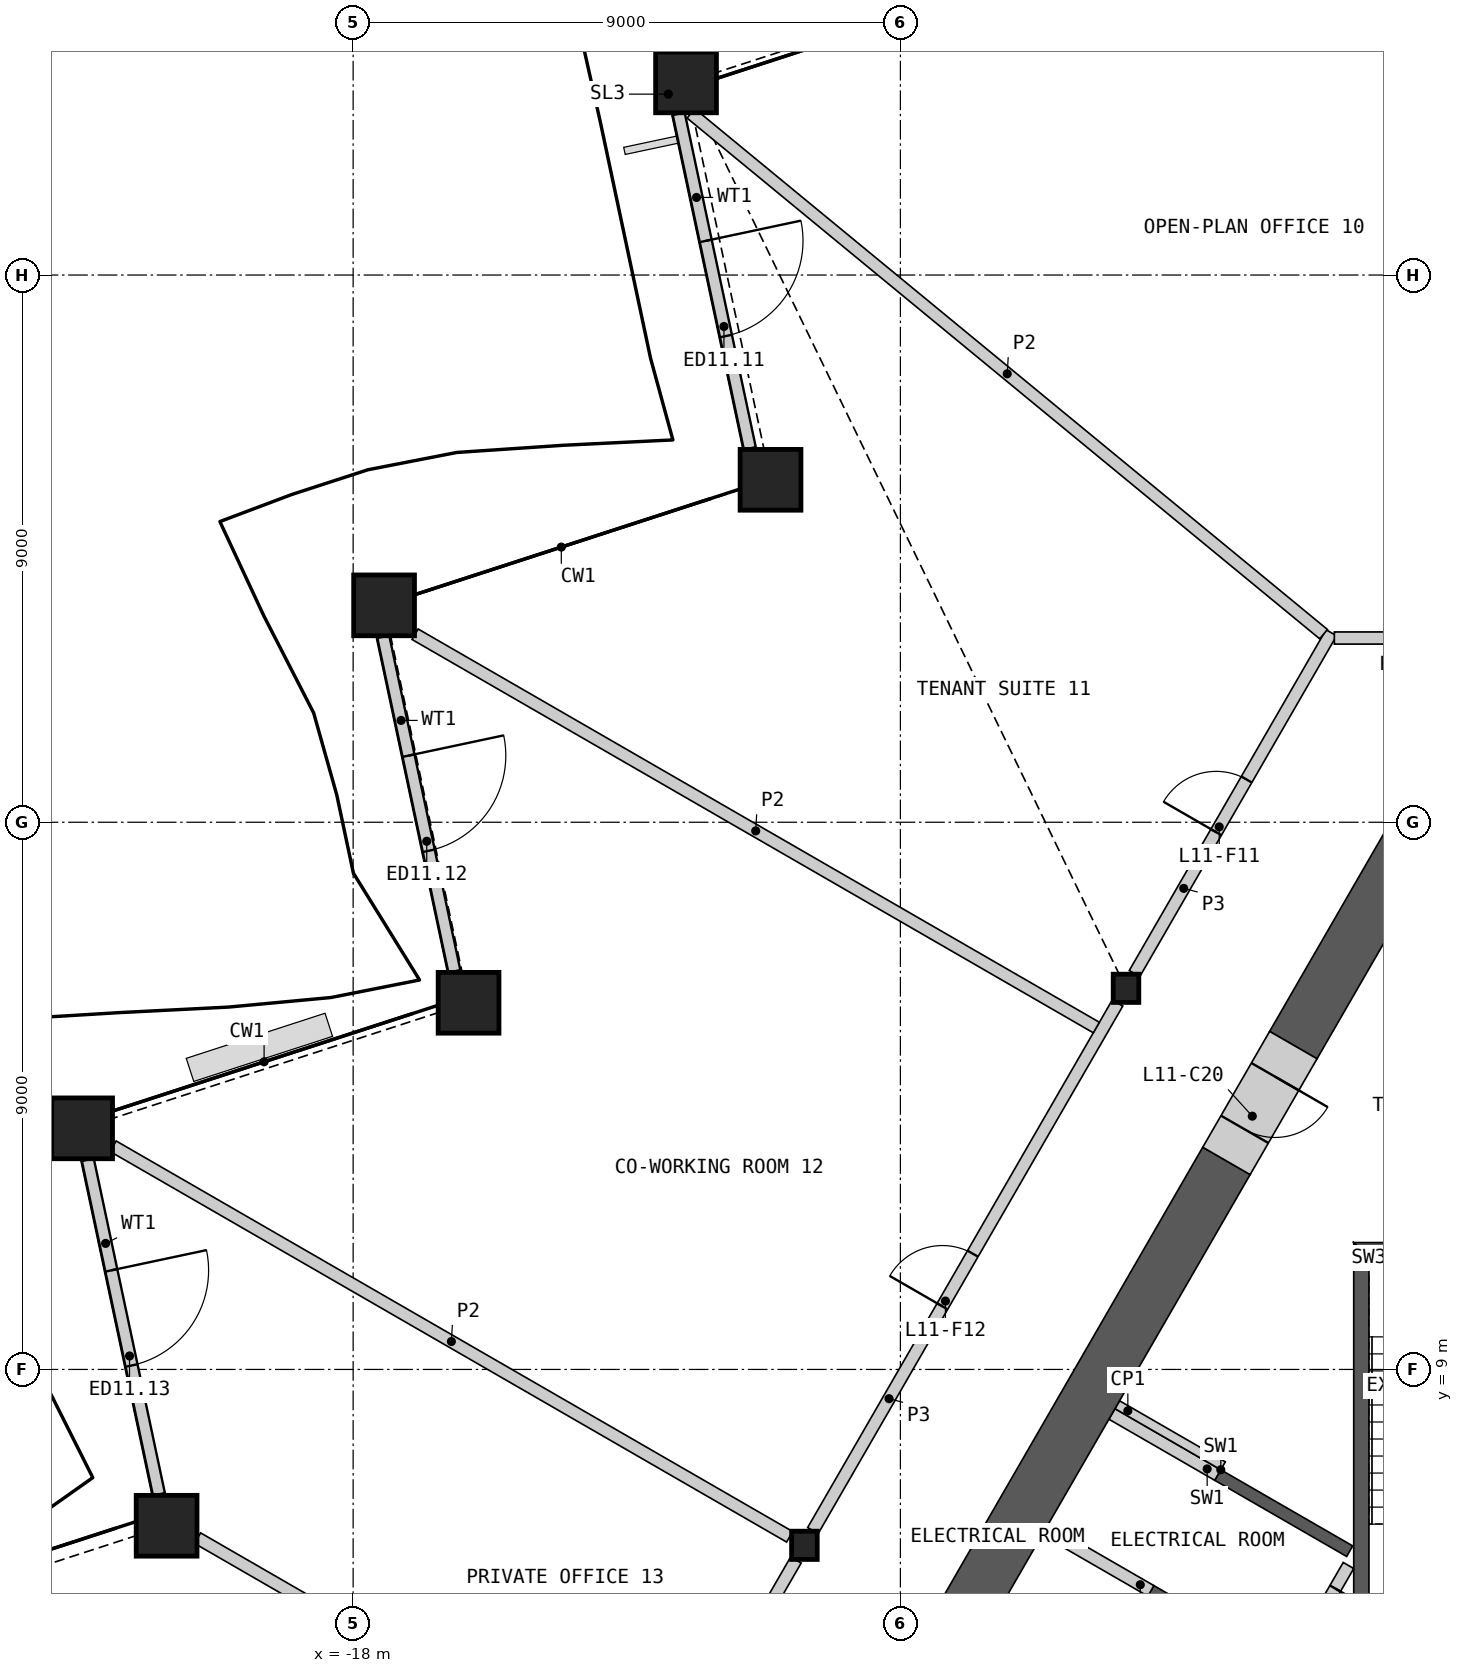
"""IFC4 building model, lengths in metres.
Left out: names, types, materials, properties, quantities, classifications, styles, units other than length and angle.
Written with IfcOpenShell. Run it as: python <this file> out.ifc"""

import sys

from ifc_helpers import new_model, si_unit, direction, frame, frame_2d, origin, origin_2d, place, context, subcontext, project, spatial, polyline, rectangle, hollow_rectangle, i_section, outline, extrude, element, fill, save


model = new_model("IFC4")
c1 = context("Model", 3, precision=1e-05, world=origin(), true_north=direction((0.0, 1.0)))
c2 = subcontext(c1, "Body", "Model", "MODEL_VIEW")
j1 = project(units=[si_unit("LENGTHUNIT", "METRE"), si_unit("PLANEANGLEUNIT", "RADIAN")], contexts=[c1])
p1 = place(None, origin())
s1 = spatial("IfcSite", under=j1, at=p1, CompositionType="ELEMENT")
p2 = place(p1, origin())
s2 = spatial("IfcBuilding", under=s1, at=p2, CompositionType="ELEMENT")
p3 = place(p2, frame((0.0, 0.0, 55.2)))
s3 = spatial("IfcBuildingStorey", under=s2, at=p3, CompositionType="ELEMENT", Elevation=55.2)
for number, where, z_axis, x_axis in (
    (1, (-12.525, 30.169, 0.0), (0.0, 0.0, 1.0), (1.0, 0.0, 0.0)),
    (2, (-11.136, 23.632, 0.0), (0.0, 0.0, 1.0), (1.0, 0.0, 0.0)),
    (3, (-17.491, 21.567, 0.0), (0.0, 0.0, 1.0), (1.0, 0.0, 0.0)),
    (4, (-16.102, 15.031, 0.0), (0.0, 0.0, 1.0), (1.0, 0.0, 0.0)),
    (5, (-22.457, 12.966, 0.0), (0.0, 0.0, 1.0), (1.0, 0.0, 0.0)),
    (6, (-21.068, 6.429, 0.0), (0.0, 0.0, 1.0), (1.0, 0.0, 0.0)),
):
    element("IfcColumn", number, at=place(p3, frame(where, z_axis=z_axis, x_axis=x_axis)), inside=s3, PredefinedType="COLUMN", context=c2, shape_type="SweptSolid", body=[
        extrude(hollow_rectangle(XDim=1.0, YDim=1.0, WallThickness=0.07, at=origin_2d()), origin(), (0.0, 0.0, 1.0), 4.2),
    ])
for number, where, z_axis, x_axis in (
    (7, (-5.289, 15.269, 0.0), (0.0, 0.0, 1.0), (1.0, 0.0, 0.0)),
    (8, (-10.578, 6.107, 0.0), (0.0, 0.0, 1.0), (1.0, 0.0, 0.0)),
):
    element("IfcColumn", number, at=place(p3, frame(where, z_axis=z_axis, x_axis=x_axis)), inside=s3, PredefinedType="COLUMN", context=c2, shape_type="SweptSolid", body=[
        extrude(i_section(OverallWidth=0.421, OverallDepth=0.465, WebThickness=0.045, FlangeThickness=0.072, at=origin_2d()), origin(), (0.0, 0.0, 1.0), 4.2),
    ])
p4 = place(p3, frame((-12.646, 29.652, 0.0), z_axis=(0.0, 0.0, 1.0), x_axis=(0.207901831982, -0.978149696242, 0.0)))
e9 = element("IfcWall", 9, at=p4, inside=s3, PredefinedType="SOLIDWALL", context=c2, shape_type="SweptSolid", body=[
    extrude(rectangle(XDim=5.626, YDim=0.2, at=frame_2d((2.813, 0.0))), origin(), (0.0, 0.0, 1.0), 3.189),
])
p5 = place(p4, frame((2.137, 0.0, 0.0)))
e10 = element("IfcOpeningElement", 10, at=p5, cuts=e9, PredefinedType="OPENING", context=c2, shape_type="SweptSolid", body=[
    extrude(rectangle(XDim=1.6, YDim=2.4, at=frame_2d((0.8, 1.2))), frame((0.0, 0.11, 0.0), z_axis=(0.0, -1.0, 0.0), x_axis=(1.0, 0.0, 0.0)), (0.0, 0.0, 1.0), 0.22),
])
p6 = place(p3, frame((-17.504, 21.051, 0.0), z_axis=(0.0, 0.0, 1.0), x_axis=(0.207901831982, -0.978149696242, 0.0)))
e11 = element("IfcWall", 11, at=p6, inside=s3, PredefinedType="SOLIDWALL", context=c2, shape_type="SweptSolid", body=[
    extrude(rectangle(XDim=5.626, YDim=0.2, at=frame_2d((2.813, 0.0))), origin(), (0.0, 0.0, 1.0), 3.189),
])
p7 = place(p6, frame((1.998, 0.0, 0.0)))
e12 = element("IfcOpeningElement", 12, at=p7, cuts=e11, PredefinedType="OPENING", context=c2, shape_type="SweptSolid", body=[
    extrude(rectangle(XDim=1.6, YDim=2.4, at=frame_2d((0.8, 1.2))), frame((0.0, 0.11, 0.0), z_axis=(0.0, -1.0, 0.0), x_axis=(1.0, 0.0, 0.0)), (0.0, 0.0, 1.0), 0.22),
])
p8 = place(p3, frame((-22.363, 12.449, 0.0), z_axis=(0.0, 0.0, 1.0), x_axis=(0.207901831982, -0.978149696242, 0.0)))
e13 = element("IfcWall", 13, at=p8, inside=s3, PredefinedType="SOLIDWALL", context=c2, shape_type="SweptSolid", body=[
    extrude(rectangle(XDim=5.626, YDim=0.2, at=frame_2d((2.813, 0.0))), origin(), (0.0, 0.0, 1.0), 3.189),
])
p9 = place(p8, frame((1.86, 0.0, 0.0)))
e14 = element("IfcOpeningElement", 14, at=p9, cuts=e13, PredefinedType="OPENING", context=c2, shape_type="SweptSolid", body=[
    extrude(rectangle(XDim=1.6, YDim=2.4, at=frame_2d((0.8, 1.2))), frame((0.0, 0.11, 0.0), z_axis=(0.0, -1.0, 0.0), x_axis=(1.0, 0.0, 0.0)), (0.0, 0.0, 1.0), 0.22),
])
p10 = place(p3, origin())
e15 = element("IfcWall", 15, at=p10, inside=s3, PredefinedType="SHEAR", context=c2, shape_type="SweptSolid", body=[
    extrude(outline(polyline([(-2.76, 4.019), (-4.931, 5.272), (-4.831, 5.445), (-2.66, 4.192), (-2.76, 4.019)])), origin(), (0.0, 0.0, 1.0), 3.8),
])
p11 = place(p3, origin())
e16 = element("IfcWall", 16, at=p11, inside=s3, PredefinedType="SHEAR", context=c2, shape_type="SweptSolid", body=[
    extrude(outline(polyline([(-3.731, 7.35), (-1.561, 6.097), (-1.66, 5.924), (-3.831, 7.177), (-3.731, 7.35)])), origin(), (0.0, 0.0, 1.0), 3.8),
])
p12 = place(p3, frame((-1.631, 5.776, 0.0), z_axis=(0.0, 0.0, 1.0), x_axis=(-0.499992876559, -0.866029516466, 0.0)))
e17 = element("IfcWall", 17, at=p12, inside=s3, PredefinedType="SOLIDWALL", context=c2, shape_type="SweptSolid", body=[
    extrude(rectangle(XDim=6.486, YDim=0.2, at=frame_2d((3.243, 0.0))), origin(), (0.0, 0.0, 1.0), 3.8),
])
p13 = place(p12, frame((0.437, 0.0, 0.0)))
e18 = element("IfcOpeningElement", 18, at=p13, cuts=e17, PredefinedType="OPENING", context=c2, shape_type="SweptSolid", body=[
    extrude(rectangle(XDim=0.9, YDim=2.1, at=frame_2d((0.45, 1.05))), frame((0.0, 0.11, 0.0), z_axis=(0.0, -1.0, 0.0), x_axis=(1.0, 0.0, 0.0)), (0.0, 0.0, 1.0), 0.22),
])
p14 = place(p12, frame((2.637, 0.0, 0.0)))
e19 = element("IfcOpeningElement", 19, at=p14, cuts=e17, PredefinedType="OPENING", context=c2, shape_type="SweptSolid", body=[
    extrude(rectangle(XDim=0.9, YDim=2.1, at=frame_2d((0.45, 1.05))), frame((0.0, 0.11, 0.0), z_axis=(0.0, -1.0, 0.0), x_axis=(1.0, 0.0, 0.0)), (0.0, 0.0, 1.0), 0.22),
])
p15 = place(p3, frame((-3.781, 7.263, 0.0), z_axis=(0.0, 0.0, 1.0), x_axis=(-0.865983199114, 0.50007309351, 0.0)))
e20 = element("IfcWall", 20, at=p15, inside=s3, PredefinedType="SHEAR", context=c2, shape_type="SweptSolid", body=[
    extrude(rectangle(XDim=2.009, YDim=0.2, at=frame_2d((1.004, 0.0))), origin(), (0.0, 0.0, 1.0), 3.8),
])
p16 = place(p3, frame((-4.881, 5.358, 0.0), z_axis=(0.0, 0.0, 1.0), x_axis=(-0.866035824272, 0.499981950752, 0.0)))
e21 = element("IfcWall", 21, at=p16, inside=s3, PredefinedType="SHEAR", context=c2, shape_type="SweptSolid", body=[
    extrude(rectangle(XDim=2.009, YDim=0.2, at=frame_2d((1.004, 0.0))), origin(), (0.0, 0.0, 1.0), 3.8),
])
p17 = place(p3, origin())
e22 = element("IfcWall", 22, at=p17, inside=s3, PredefinedType="SHEAR", context=c2, shape_type="SweptSolid", body=[
    extrude(outline(polyline([(1.544, 11.087), (-1.544, 11.087), (-1.294, 10.837), (1.294, 10.837), (1.544, 11.087)])), origin(), (0.0, 0.0, 1.0), 3.8),
])
p18 = place(p3, origin())
e23 = element("IfcWall", 23, at=p18, inside=s3, PredefinedType="SHEAR", context=c2, shape_type="SweptSolid", body=[
    extrude(outline(polyline([(-1.294, 10.837), (-1.544, 11.087), (-1.544, 5.237), (-1.294, 5.237), (-1.294, 10.837)])), origin(), (0.0, 0.0, 1.0), 3.8),
])
p19 = place(p3, frame((-3.693, 7.415, 0.0), z_axis=(0.0, 0.0, 1.0), x_axis=(-0.866035824272, 0.499981950752, 0.0)))
e24 = element("IfcWall", 24, at=p19, inside=s3, PredefinedType="PARTITIONING", context=c2, shape_type="SweptSolid", body=[
    extrude(rectangle(XDim=2.009, YDim=0.15, at=frame_2d((1.004, 0.0))), origin(), (0.0, 0.0, 1.0), 3.8),
])
p20 = place(p3, frame((-3.637, 12.43, 0.0), z_axis=(0.0, 0.0, 1.0), x_axis=(-0.500011513458, -0.866018756384, 0.0)))
e25 = element("IfcWall", 25, at=p20, inside=s3, PredefinedType="SHEAR", context=c2, shape_type="SweptSolid", body=[
    extrude(rectangle(XDim=9.066, YDim=0.9, at=frame_2d((4.533, 0.0))), origin(), (0.0, 0.0, 1.0), 3.8),
])
p21 = place(p3, frame((-0.39, 18.055, 0.0), z_axis=(0.0, 0.0, 1.0), x_axis=(-0.500014347272, -0.866017120224, 0.0)))
e26 = element("IfcWall", 26, at=p21, inside=s3, PredefinedType="SHEAR", context=c2, shape_type="SweptSolid", body=[
    extrude(rectangle(XDim=4.296, YDim=0.9, at=frame_2d((2.148, 0.0))), origin(), (0.0, 0.0, 1.0), 3.8),
])
p22 = place(p3, frame((-2.538, 14.335, 0.0), z_axis=(0.0, 0.0, 1.0), x_axis=(-0.499994660107, -0.866028486751, 0.0)))
e27 = element("IfcWall", 27, at=p22, inside=s3, PredefinedType="SHEAR", context=c2, shape_type="SweptSolid", body=[
    extrude(rectangle(XDim=2.2, YDim=0.9, at=frame_2d((1.1, 0.0))), origin(), (0.0, 0.0, 1.0), 3.8),
])
p23 = place(p22, frame((0.6, 0.0, 0.0)))
e28 = element("IfcOpeningElement", 28, at=p23, cuts=e27, PredefinedType="OPENING", context=c2, shape_type="SweptSolid", body=[
    extrude(rectangle(XDim=1.0, YDim=2.1, at=frame_2d((0.5, 1.05))), frame((0.0, 0.46, 0.0), z_axis=(0.0, -1.0, 0.0), x_axis=(1.0, 0.0, 0.0)), (0.0, 0.0, 1.0), 0.92),
])
p24 = place(p3, frame((-10.439, 6.35, 0.0), z_axis=(0.0, 0.0, 1.0), x_axis=(0.50001002959, 0.86601961312, 0.0)))
e29 = element("IfcWall", 29, at=p24, inside=s3, PredefinedType="PARTITIONING", context=c2, shape_type="SweptSolid", body=[
    extrude(rectangle(XDim=10.019, YDim=0.2, at=frame_2d((5.009, 0.0))), origin(), (0.0, 0.0, 1.0), 3.8),
])
p25 = place(p24, frame((4.259, 0.0, 0.0)))
e30 = element("IfcOpeningElement", 30, at=p25, cuts=e29, PredefinedType="OPENING", context=c2, shape_type="SweptSolid", body=[
    extrude(rectangle(XDim=1.0, YDim=2.1, at=frame_2d((0.5, 1.05))), frame((0.0, 0.11, 0.0), z_axis=(0.0, -1.0, 0.0), x_axis=(1.0, 0.0, 0.0)), (0.0, 0.0, 1.0), 0.22),
])
p26 = place(p3, frame((-15.728, -2.811, 0.0), z_axis=(0.0, 0.0, 1.0), x_axis=(0.49999175339, 0.866030164915, 0.0)))
e31 = element("IfcWall", 31, at=p26, inside=s3, PredefinedType="PARTITIONING", context=c2, shape_type="SweptSolid", body=[
    extrude(rectangle(XDim=10.019, YDim=0.2, at=frame_2d((5.009, 0.0))), origin(), (0.0, 0.0, 1.0), 3.8),
])
p27 = place(p26, frame((7.266, 0.0, 0.0)))
e32 = element("IfcOpeningElement", 32, at=p27, cuts=e31, PredefinedType="OPENING", context=c2, shape_type="SweptSolid", body=[
    extrude(rectangle(XDim=1.0, YDim=2.1, at=frame_2d((0.5, 1.05))), frame((0.0, 0.11, 0.0), z_axis=(0.0, -1.0, 0.0), x_axis=(1.0, 0.0, 0.0)), (0.0, 0.0, 1.0), 0.22),
])
p28 = place(p3, frame((-5.149, 15.511, 0.0), z_axis=(0.0, 0.0, 1.0), x_axis=(0.500001069878, 0.866024786089, 0.0)))
e33 = element("IfcWall", 33, at=p28, inside=s3, PredefinedType="PARTITIONING", context=c2, shape_type="SweptSolid", body=[
    extrude(rectangle(XDim=6.473, YDim=0.2, at=frame_2d((3.236, 0.0))), origin(), (0.0, 0.0, 1.0), 3.8),
])
p29 = place(p28, frame((2.686, 0.0, 0.0)))
e34 = element("IfcOpeningElement", 34, at=p29, cuts=e33, PredefinedType="OPENING", context=c2, shape_type="SweptSolid", body=[
    extrude(rectangle(XDim=1.0, YDim=2.1, at=frame_2d((0.5, 1.05))), frame((0.0, 0.11, 0.0), z_axis=(0.0, -1.0, 0.0), x_axis=(1.0, 0.0, 0.0)), (0.0, 0.0, 1.0), 0.22),
])
p30 = place(p3, frame((-1.863, 21.03, 0.0), z_axis=(0.0, 0.0, 1.0), x_axis=(1.0, 0.0, 0.0)))
e35 = element("IfcWall", 35, at=p30, inside=s3, PredefinedType="PARTITIONING", context=c2, shape_type="SweptSolid", body=[
    extrude(rectangle(XDim=3.726, YDim=0.2, at=frame_2d((1.863, 0.0))), origin(), (0.0, 0.0, 1.0), 3.8),
])
p31 = place(p30, frame((0.963, 0.0, 0.0)))
e36 = element("IfcOpeningElement", 36, at=p31, cuts=e35, PredefinedType="OPENING", context=c2, shape_type="SweptSolid", body=[
    extrude(rectangle(XDim=1.8, YDim=2.1, at=frame_2d((0.9, 1.05))), frame((0.0, 0.11, 0.0), z_axis=(0.0, -1.0, 0.0), x_axis=(1.0, 0.0, 0.0)), (0.0, 0.0, 1.0), 0.22),
])
p32 = place(p3, frame((-12.445, 29.659, 0.0), z_axis=(0.0, 0.0, 1.0), x_axis=(0.772048928551, -0.635563098302, 0.0)))
e37 = element("IfcWall", 37, at=p32, inside=s3, PredefinedType="PARTITIONING", context=c2, shape_type="SweptSolid", body=[
    extrude(rectangle(XDim=13.477, YDim=0.2, at=frame_2d((6.738, 0.0))), origin(), (0.0, 0.0, 1.0), 2.885),
])
p33 = place(p3, frame((-16.981, 21.092, 0.0), z_axis=(0.0, 0.0, 1.0), x_axis=(0.866026884493, -0.499997435328, 0.0)))
e38 = element("IfcWall", 38, at=p33, inside=s3, PredefinedType="PARTITIONING", context=c2, shape_type="SweptSolid", body=[
    extrude(rectangle(XDim=12.937, YDim=0.2, at=frame_2d((6.469, 0.0))), origin(), (0.0, 0.0, 1.0), 2.885),
])
p34 = place(p3, frame((-21.947, 12.671, 0.0), z_axis=(0.0, 0.0, 1.0), x_axis=(0.866026729935, -0.499997703033, 0.0)))
e39 = element("IfcWall", 39, at=p34, inside=s3, PredefinedType="PARTITIONING", context=c2, shape_type="SweptSolid", body=[
    extrude(rectangle(XDim=12.848, YDim=0.2, at=frame_2d((6.424, 0.0))), origin(), (0.0, 0.0, 1.0), 2.885),
])
p35 = place(p3, frame((-20.558, 6.225, 0.0), z_axis=(0.0, 0.0, 1.0), x_axis=(0.866031967744, -0.499988630717, 0.0)))
e40 = element("IfcWall", 40, at=p35, inside=s3, PredefinedType="PARTITIONING", context=c2, shape_type="SweptSolid", body=[
    extrude(rectangle(XDim=8.601, YDim=0.2, at=frame_2d((4.301, 0.0))), origin(), (0.0, 0.0, 1.0), 2.885),
])
p36 = place(p5, origin())
e41 = element("IfcDoor", 41, at=p36, inside=s3, OperationType="DOUBLE_DOOR_SINGLE_SWING", PredefinedType="DOOR", context=c2, shape_type="SweptSolid", body=[
    extrude(rectangle(XDim=1.6, YDim=2.4, at=frame_2d((0.8, 1.2))), frame((0.0, 0.025, 0.0), z_axis=(0.0, -1.0, 0.0), x_axis=(1.0, 0.0, 0.0)), (0.0, 0.0, 1.0), 0.05),
])
fill(e10, e41)
p37 = place(p7, origin())
e42 = element("IfcDoor", 42, at=p37, inside=s3, OperationType="DOUBLE_DOOR_SINGLE_SWING", PredefinedType="DOOR", context=c2, shape_type="SweptSolid", body=[
    extrude(rectangle(XDim=1.6, YDim=2.4, at=frame_2d((0.8, 1.2))), frame((0.0, 0.025, 0.0), z_axis=(0.0, -1.0, 0.0), x_axis=(1.0, 0.0, 0.0)), (0.0, 0.0, 1.0), 0.05),
])
fill(e12, e42)
p38 = place(p9, origin())
e43 = element("IfcDoor", 43, at=p38, inside=s3, OperationType="DOUBLE_DOOR_SINGLE_SWING", PredefinedType="DOOR", context=c2, shape_type="SweptSolid", body=[
    extrude(rectangle(XDim=1.6, YDim=2.4, at=frame_2d((0.8, 1.2))), frame((0.0, 0.025, 0.0), z_axis=(0.0, -1.0, 0.0), x_axis=(1.0, 0.0, 0.0)), (0.0, 0.0, 1.0), 0.05),
])
fill(e14, e43)
p39 = place(p13, origin())
e44 = element("IfcDoor", 44, at=p39, inside=s3, OperationType="SINGLE_SWING_LEFT", PredefinedType="DOOR", context=c2, shape_type="SweptSolid", body=[
    extrude(rectangle(XDim=0.9, YDim=2.1, at=frame_2d((0.45, 1.05))), frame((0.0, 0.025, 0.0), z_axis=(0.0, -1.0, 0.0), x_axis=(1.0, 0.0, 0.0)), (0.0, 0.0, 1.0), 0.05),
])
fill(e18, e44)
p40 = place(p23, origin())
e45 = element("IfcDoor", 45, at=p40, inside=s3, OperationType="SINGLE_SWING_LEFT", PredefinedType="DOOR", context=c2, shape_type="SweptSolid", body=[
    extrude(rectangle(XDim=1.0, YDim=2.1, at=frame_2d((0.5, 1.05))), frame((0.0, 0.205, 0.0), z_axis=(0.0, -1.0, 0.0), x_axis=(1.0, 0.0, 0.0)), (0.0, 0.0, 1.0), 0.05),
])
fill(e28, e45)
p41 = place(p29, origin())
e46 = element("IfcDoor", 46, at=p41, inside=s3, OperationType="SINGLE_SWING_LEFT", PredefinedType="DOOR", context=c2, shape_type="SweptSolid", body=[
    extrude(rectangle(XDim=1.0, YDim=2.1, at=frame_2d((0.5, 1.05))), frame((0.0, 0.025, 0.0), z_axis=(0.0, -1.0, 0.0), x_axis=(1.0, 0.0, 0.0)), (0.0, 0.0, 1.0), 0.05),
])
fill(e34, e46)
p42 = place(p25, origin())
e47 = element("IfcDoor", 47, at=p42, inside=s3, OperationType="SINGLE_SWING_LEFT", PredefinedType="DOOR", context=c2, shape_type="SweptSolid", body=[
    extrude(rectangle(XDim=1.0, YDim=2.1, at=frame_2d((0.5, 1.05))), frame((0.0, 0.025, 0.0), z_axis=(0.0, -1.0, 0.0), x_axis=(1.0, 0.0, 0.0)), (0.0, 0.0, 1.0), 0.05),
])
fill(e30, e47)
save(model, sys.argv[1])
